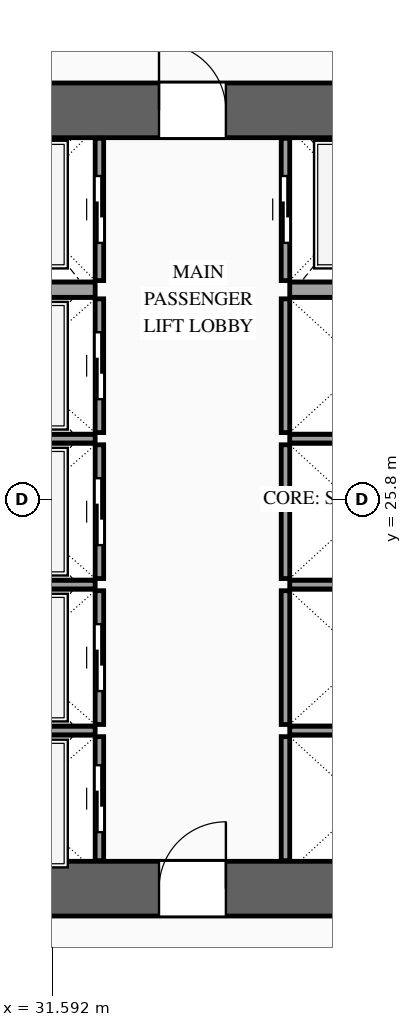
"""IFC4 building model, lengths in metres.
Left out: names, types, materials, properties, quantities, classifications, styles, units other than length and angle.
Written with IfcOpenShell. Run it as: python <this file> out.ifc"""

import sys

from ifc_helpers import new_model, si_unit, direction, frame, frame_2d, origin, place, context, subcontext, project, spatial, rectangle, extrude, source, transform, mapped, element, fill, save


model = new_model("IFC4")
c1 = context("Model", 3, precision=1e-05, world=origin(), true_north=direction((0.0, 1.0)))
c2 = subcontext(c1, "Body", "Model", "MODEL_VIEW")
j1 = project(units=[si_unit("LENGTHUNIT", "METRE"), si_unit("PLANEANGLEUNIT", "RADIAN")], contexts=[c1])
p1 = place(None, origin())
s1 = spatial("IfcSite", under=j1, at=p1, CompositionType="ELEMENT")
p2 = place(p1, origin())
s2 = spatial("IfcBuilding", under=s1, at=p2, CompositionType="ELEMENT")
p3 = place(p2, frame((0.0, 0.0, 60.4)))
s3 = spatial("IfcBuildingStorey", under=s2, at=p3, CompositionType="ELEMENT", Elevation=60.4)
p4 = place(p3, frame((23.35, 19.4, 0.0), z_axis=(0.0, 0.0, 1.0), x_axis=(1.0, 0.0, 0.0)))
e1 = element("IfcWall", 1, at=p4, inside=s3, PredefinedType="SHEAR", context=c2, shape_type="SweptSolid", body=[
    extrude(rectangle(XDim=27.3, YDim=0.9, at=frame_2d((13.65, 0.0))), origin(), (0.0, 0.0, 1.0), 3.6),
])
p5 = place(p4, frame((2.1, 0.0, 0.0)))
e2 = element("IfcOpeningElement", 2, at=p5, cuts=e1, PredefinedType="OPENING", context=c2, shape_type="SweptSolid", body=[
    extrude(rectangle(XDim=1.1, YDim=2.2, at=frame_2d((0.55, 1.1))), frame((0.0, 0.465, 0.0), z_axis=(0.0, -1.0, 0.0), x_axis=(1.0, 0.0, 0.0)), (0.0, 0.0, 1.0), 0.93),
])
p6 = place(p4, frame((10.0, 0.0, 0.0)))
e3 = element("IfcOpeningElement", 3, at=p6, cuts=e1, PredefinedType="OPENING", context=c2, shape_type="SweptSolid", body=[
    extrude(rectangle(XDim=1.1, YDim=2.2, at=frame_2d((0.55, 1.1))), frame((0.0, 0.465, 0.0), z_axis=(0.0, -1.0, 0.0), x_axis=(1.0, 0.0, 0.0)), (0.0, 0.0, 1.0), 0.93),
])
p7 = place(p4, frame((23.2, 0.0, 0.0)))
e4 = element("IfcOpeningElement", 4, at=p7, cuts=e1, PredefinedType="OPENING", context=c2, shape_type="SweptSolid", body=[
    extrude(rectangle(XDim=1.1, YDim=2.2, at=frame_2d((0.55, 1.1))), frame((0.0, 0.465, 0.0), z_axis=(0.0, -1.0, 0.0), x_axis=(1.0, 0.0, 0.0)), (0.0, 0.0, 1.0), 0.93),
])
p8 = place(p4, frame((19.82, 0.0, 0.0)))
e5 = element("IfcOpeningElement", 5, at=p8, cuts=e1, PredefinedType="OPENING", context=c2, shape_type="SweptSolid", body=[
    extrude(rectangle(XDim=0.9, YDim=2.15, at=frame_2d((0.45, 1.075))), frame((0.0, 0.465, 0.0), z_axis=(0.0, -1.0, 0.0), x_axis=(1.0, 0.0, 0.0)), (0.0, 0.0, 1.0), 0.93),
])
p9 = place(p4, frame((18.38, 0.0, 0.0)))
e6 = element("IfcOpeningElement", 6, at=p9, cuts=e1, PredefinedType="OPENING", context=c2, shape_type="SweptSolid", body=[
    extrude(rectangle(XDim=0.9, YDim=2.15, at=frame_2d((0.45, 1.075))), frame((0.0, 0.465, 0.0), z_axis=(0.0, -1.0, 0.0), x_axis=(1.0, 0.0, 0.0)), (0.0, 0.0, 1.0), 0.93),
])
p10 = place(p3, frame((23.35, 32.2, 0.0), z_axis=(0.0, 0.0, 1.0), x_axis=(1.0, 0.0, 0.0)))
e7 = element("IfcWall", 7, at=p10, inside=s3, PredefinedType="SHEAR", context=c2, shape_type="SweptSolid", body=[
    extrude(rectangle(XDim=27.3, YDim=0.9, at=frame_2d((13.65, 0.0))), origin(), (0.0, 0.0, 1.0), 3.6),
])
p11 = place(p10, frame((4.72, 0.0, 0.0)))
e8 = element("IfcOpeningElement", 8, at=p11, cuts=e7, PredefinedType="OPENING", context=c2, shape_type="SweptSolid", body=[
    extrude(rectangle(XDim=0.9, YDim=2.15, at=frame_2d((0.45, 1.075))), frame((0.0, 0.465, 0.0), z_axis=(0.0, -1.0, 0.0), x_axis=(1.0, 0.0, 0.0)), (0.0, 0.0, 1.0), 0.93),
])
p12 = place(p10, frame((10.0, 0.0, 0.0)))
e9 = element("IfcOpeningElement", 9, at=p12, cuts=e7, PredefinedType="OPENING", context=c2, shape_type="SweptSolid", body=[
    extrude(rectangle(XDim=1.1, YDim=2.2, at=frame_2d((0.55, 1.1))), frame((0.0, 0.465, 0.0), z_axis=(0.0, -1.0, 0.0), x_axis=(1.0, 0.0, 0.0)), (0.0, 0.0, 1.0), 0.93),
])
p13 = place(p10, frame((15.85, 0.0, 0.0)))
e10 = element("IfcOpeningElement", 10, at=p13, cuts=e7, PredefinedType="OPENING", context=c2, shape_type="SweptSolid", body=[
    extrude(rectangle(XDim=1.1, YDim=2.2, at=frame_2d((0.55, 1.1))), frame((0.0, 0.465, 0.0), z_axis=(0.0, -1.0, 0.0), x_axis=(1.0, 0.0, 0.0)), (0.0, 0.0, 1.0), 0.93),
])
p14 = place(p10, frame((19.82, 0.0, 0.0)))
e11 = element("IfcOpeningElement", 11, at=p14, cuts=e7, PredefinedType="OPENING", context=c2, shape_type="SweptSolid", body=[
    extrude(rectangle(XDim=0.9, YDim=2.15, at=frame_2d((0.45, 1.075))), frame((0.0, 0.465, 0.0), z_axis=(0.0, -1.0, 0.0), x_axis=(1.0, 0.0, 0.0)), (0.0, 0.0, 1.0), 0.93),
])
p15 = place(p3, frame((32.37, 19.86, 0.0), z_axis=(0.0, 0.0, 1.0), x_axis=(0.0, 1.0, 0.0)))
e12 = element("IfcWall", 12, at=p15, inside=s3, PredefinedType="SOLIDWALL", context=c2, shape_type="SweptSolid", body=[
    extrude(rectangle(XDim=2.04, YDim=0.14, at=frame_2d((1.02, 0.0))), origin(), (0.0, 0.0, 1.0), 3.38),
])
p16 = place(p15, frame((0.47, 0.0, 0.0)))
e13 = element("IfcOpeningElement", 13, at=p16, cuts=e12, PredefinedType="OPENING", context=c2, shape_type="SweptSolid", body=[
    extrude(rectangle(XDim=1.1, YDim=2.2, at=frame_2d((0.55, 1.1))), frame((0.0, 0.085, 0.0), z_axis=(0.0, -1.0, 0.0), x_axis=(1.0, 0.0, 0.0)), (0.0, 0.0, 1.0), 0.17),
])
m1 = source(origin(), c2, "Body", "SweptSolid", [
    extrude(rectangle(XDim=2.5, YDim=0.14, at=frame_2d((1.25, 0.0))), origin(), (0.0, 0.0, 1.0), 3.38),
])
p17 = place(p3, frame((29.8, 22.0, 0.0), z_axis=(0.0, 0.0, 1.0), x_axis=(1.0, 0.0, 0.0)))
e14 = element("IfcWall", 14, at=p17, inside=s3, PredefinedType="SOLIDWALL", context=c2, shape_type="MappedRepresentation", body=[
    mapped(m1, transform((0.0, 0.0, 0.0), scale=1.0)),
])
p18 = place(p3, frame((32.37, 22.1, 0.0), z_axis=(0.0, 0.0, 1.0), x_axis=(0.0, 1.0, 0.0)))
e15 = element("IfcWall", 15, at=p18, inside=s3, PredefinedType="SOLIDWALL", context=c2, shape_type="SweptSolid", body=[
    extrude(rectangle(XDim=2.2, YDim=0.14, at=frame_2d((1.1, 0.0))), origin(), (0.0, 0.0, 1.0), 3.38),
])
p19 = place(p18, frame((0.55, 0.0, 0.0)))
e16 = element("IfcOpeningElement", 16, at=p19, cuts=e15, PredefinedType="OPENING", context=c2, shape_type="SweptSolid", body=[
    extrude(rectangle(XDim=1.1, YDim=2.2, at=frame_2d((0.55, 1.1))), frame((0.0, 0.085, 0.0), z_axis=(0.0, -1.0, 0.0), x_axis=(1.0, 0.0, 0.0)), (0.0, 0.0, 1.0), 0.17),
])
p20 = place(p3, frame((29.8, 24.4, 0.0), z_axis=(0.0, 0.0, 1.0), x_axis=(1.0, 0.0, 0.0)))
e17 = element("IfcWall", 17, at=p20, inside=s3, PredefinedType="SOLIDWALL", context=c2, shape_type="MappedRepresentation", body=[
    mapped(m1, transform((0.0, 0.0, 0.0), scale=1.0)),
])
p21 = place(p3, frame((32.37, 24.5, 0.0), z_axis=(0.0, 0.0, 1.0), x_axis=(0.0, 1.0, 0.0)))
e18 = element("IfcWall", 18, at=p21, inside=s3, PredefinedType="SOLIDWALL", context=c2, shape_type="SweptSolid", body=[
    extrude(rectangle(XDim=2.2, YDim=0.14, at=frame_2d((1.1, 0.0))), origin(), (0.0, 0.0, 1.0), 3.38),
])
p22 = place(p21, frame((0.55, 0.0, 0.0)))
e19 = element("IfcOpeningElement", 19, at=p22, cuts=e18, PredefinedType="OPENING", context=c2, shape_type="SweptSolid", body=[
    extrude(rectangle(XDim=1.1, YDim=2.2, at=frame_2d((0.55, 1.1))), frame((0.0, 0.085, 0.0), z_axis=(0.0, -1.0, 0.0), x_axis=(1.0, 0.0, 0.0)), (0.0, 0.0, 1.0), 0.17),
])
p23 = place(p3, frame((29.8, 26.8, 0.0), z_axis=(0.0, 0.0, 1.0), x_axis=(1.0, 0.0, 0.0)))
e20 = element("IfcWall", 20, at=p23, inside=s3, PredefinedType="SOLIDWALL", context=c2, shape_type="MappedRepresentation", body=[
    mapped(m1, transform((0.0, 0.0, 0.0), scale=1.0)),
])
p24 = place(p3, frame((32.37, 26.9, 0.0), z_axis=(0.0, 0.0, 1.0), x_axis=(0.0, 1.0, 0.0)))
e21 = element("IfcWall", 21, at=p24, inside=s3, PredefinedType="SOLIDWALL", context=c2, shape_type="SweptSolid", body=[
    extrude(rectangle(XDim=2.2, YDim=0.14, at=frame_2d((1.1, 0.0))), origin(), (0.0, 0.0, 1.0), 3.38),
])
p25 = place(p24, frame((0.55, 0.0, 0.0)))
e22 = element("IfcOpeningElement", 22, at=p25, cuts=e21, PredefinedType="OPENING", context=c2, shape_type="SweptSolid", body=[
    extrude(rectangle(XDim=1.1, YDim=2.2, at=frame_2d((0.55, 1.1))), frame((0.0, 0.085, 0.0), z_axis=(0.0, -1.0, 0.0), x_axis=(1.0, 0.0, 0.0)), (0.0, 0.0, 1.0), 0.17),
])
p26 = place(p3, frame((32.37, 29.4, 0.0), z_axis=(0.0, 0.0, 1.0), x_axis=(0.0, 1.0, 0.0)))
e23 = element("IfcWall", 23, at=p26, inside=s3, PredefinedType="SOLIDWALL", context=c2, shape_type="SweptSolid", body=[
    extrude(rectangle(XDim=2.34, YDim=0.14, at=frame_2d((1.17, 0.0))), origin(), (0.0, 0.0, 1.0), 3.38),
])
p27 = place(p26, frame((0.62, 0.0, 0.0)))
e24 = element("IfcOpeningElement", 24, at=p27, cuts=e23, PredefinedType="OPENING", context=c2, shape_type="SweptSolid", body=[
    extrude(rectangle(XDim=1.1, YDim=2.2, at=frame_2d((0.55, 1.1))), frame((0.0, 0.085, 0.0), z_axis=(0.0, -1.0, 0.0), x_axis=(1.0, 0.0, 0.0)), (0.0, 0.0, 1.0), 0.17),
])
m2 = source(origin(), c2, "Body", "SweptSolid", [
    extrude(rectangle(XDim=2.5, YDim=0.25, at=frame_2d((1.25, 0.0))), origin(), (0.0, 0.0, 1.0), 3.38),
])
p28 = place(p3, frame((29.8, 29.25, 0.0), z_axis=(0.0, 0.0, 1.0), x_axis=(1.0, 0.0, 0.0)))
e25 = element("IfcWall", 25, at=p28, inside=s3, PredefinedType="SOLIDWALL", context=c2, shape_type="MappedRepresentation", body=[
    mapped(m2, transform((0.0, 0.0, 0.0), scale=1.0)),
])
m3 = source(origin(), c2, "Body", "SweptSolid", [
    extrude(rectangle(XDim=2.04, YDim=0.14, at=frame_2d((1.02, 0.0))), origin(), (0.0, 0.0, 1.0), 3.38),
])
p29 = place(p3, frame((35.43, 19.86, 0.0), z_axis=(0.0, 0.0, 1.0), x_axis=(0.0, 1.0, 0.0)))
e26 = element("IfcWall", 26, at=p29, inside=s3, PredefinedType="SOLIDWALL", context=c2, shape_type="MappedRepresentation", body=[
    mapped(m3, transform((0.0, 0.0, 0.0), scale=1.0)),
])
m4 = source(origin(), c2, "Body", "SweptSolid", [
    extrude(rectangle(XDim=2.4, YDim=0.14, at=frame_2d((1.2, 0.0))), origin(), (0.0, 0.0, 1.0), 3.38),
])
p30 = place(p3, frame((35.5, 22.0, 0.0), z_axis=(0.0, 0.0, 1.0), x_axis=(1.0, 0.0, 0.0)))
e27 = element("IfcWall", 27, at=p30, inside=s3, PredefinedType="SOLIDWALL", context=c2, shape_type="MappedRepresentation", body=[
    mapped(m4, transform((0.0, 0.0, 0.0), scale=1.0)),
])
m5 = source(origin(), c2, "Body", "SweptSolid", [
    extrude(rectangle(XDim=2.2, YDim=0.14, at=frame_2d((1.1, 0.0))), origin(), (0.0, 0.0, 1.0), 3.38),
])
p31 = place(p3, frame((35.43, 22.1, 0.0), z_axis=(0.0, 0.0, 1.0), x_axis=(0.0, 1.0, 0.0)))
e28 = element("IfcWall", 28, at=p31, inside=s3, PredefinedType="SOLIDWALL", context=c2, shape_type="MappedRepresentation", body=[
    mapped(m5, transform((0.0, 0.0, 0.0), scale=1.0)),
])
p32 = place(p3, frame((35.5, 24.4, 0.0), z_axis=(0.0, 0.0, 1.0), x_axis=(1.0, 0.0, 0.0)))
e29 = element("IfcWall", 29, at=p32, inside=s3, PredefinedType="SOLIDWALL", context=c2, shape_type="MappedRepresentation", body=[
    mapped(m4, transform((0.0, 0.0, 0.0), scale=1.0)),
])
p33 = place(p3, frame((35.43, 24.5, 0.0), z_axis=(0.0, 0.0, 1.0), x_axis=(0.0, 1.0, 0.0)))
e30 = element("IfcWall", 30, at=p33, inside=s3, PredefinedType="SOLIDWALL", context=c2, shape_type="MappedRepresentation", body=[
    mapped(m5, transform((0.0, 0.0, 0.0), scale=1.0)),
])
p34 = place(p3, frame((35.5, 26.8, 0.0), z_axis=(0.0, 0.0, 1.0), x_axis=(1.0, 0.0, 0.0)))
e31 = element("IfcWall", 31, at=p34, inside=s3, PredefinedType="SOLIDWALL", context=c2, shape_type="MappedRepresentation", body=[
    mapped(m4, transform((0.0, 0.0, 0.0), scale=1.0)),
])
m6 = source(origin(), c2, "Body", "SweptSolid", [
    extrude(rectangle(XDim=2.2, YDim=0.14, at=frame_2d((1.1, 0.0))), origin(), (0.0, 0.0, 1.0), 3.38),
])
p35 = place(p3, frame((35.43, 26.9, 0.0), z_axis=(0.0, 0.0, 1.0), x_axis=(0.0, 1.0, 0.0)))
e32 = element("IfcWall", 32, at=p35, inside=s3, PredefinedType="SOLIDWALL", context=c2, shape_type="MappedRepresentation", body=[
    mapped(m6, transform((0.0, 0.0, 0.0), scale=1.0)),
])
p36 = place(p3, frame((35.43, 29.4, 0.0), z_axis=(0.0, 0.0, 1.0), x_axis=(0.0, 1.0, 0.0)))
e33 = element("IfcWall", 33, at=p36, inside=s3, PredefinedType="SOLIDWALL", context=c2, shape_type="SweptSolid", body=[
    extrude(rectangle(XDim=2.34, YDim=0.14, at=frame_2d((1.17, 0.0))), origin(), (0.0, 0.0, 1.0), 3.38),
])
p37 = place(p36, frame((0.62, 0.0, 0.0)))
e34 = element("IfcOpeningElement", 34, at=p37, cuts=e33, PredefinedType="OPENING", context=c2, shape_type="SweptSolid", body=[
    extrude(rectangle(XDim=1.1, YDim=2.2, at=frame_2d((0.55, 1.1))), frame((0.0, 0.085, 0.0), z_axis=(0.0, -1.0, 0.0), x_axis=(1.0, 0.0, 0.0)), (0.0, 0.0, 1.0), 0.17),
])
m7 = source(origin(), c2, "Body", "SweptSolid", [
    extrude(rectangle(XDim=2.4, YDim=0.25, at=frame_2d((1.2, 0.0))), origin(), (0.0, 0.0, 1.0), 3.38),
])
p38 = place(p3, frame((35.5, 29.25, 0.0), z_axis=(0.0, 0.0, 1.0), x_axis=(1.0, 0.0, 0.0)))
e35 = element("IfcWall", 35, at=p38, inside=s3, PredefinedType="SOLIDWALL", context=c2, shape_type="MappedRepresentation", body=[
    mapped(m7, transform((0.0, 0.0, 0.0), scale=1.0)),
])
m8 = source(origin(), c2, "Body", "SweptSolid", [
    extrude(rectangle(XDim=1.1, YDim=2.2, at=frame_2d((0.55, 1.1))), frame((0.0, 0.025, 0.0), z_axis=(0.0, -1.0, 0.0), x_axis=(1.0, 0.0, 0.0)), (0.0, 0.0, 1.0), 0.05),
])
p39 = place(p16, origin())
e36 = element("IfcDoor", 36, at=p39, inside=s3, OperationType="SLIDING_TO_LEFT", PredefinedType="DOOR", context=c2, shape_type="MappedRepresentation", body=[
    mapped(m8, transform((0.0, 0.0, 0.0), scale=1.0)),
])
fill(e13, e36)
p40 = place(p19, origin())
e37 = element("IfcDoor", 37, at=p40, inside=s3, OperationType="SLIDING_TO_RIGHT", PredefinedType="DOOR", context=c2, shape_type="MappedRepresentation", body=[
    mapped(m8, transform((0.0, 0.0, 0.0), scale=1.0)),
])
fill(e16, e37)
p41 = place(p22, origin())
e38 = element("IfcDoor", 38, at=p41, inside=s3, OperationType="SLIDING_TO_LEFT", PredefinedType="DOOR", context=c2, shape_type="MappedRepresentation", body=[
    mapped(m8, transform((0.0, 0.0, 0.0), scale=1.0)),
])
fill(e19, e38)
p42 = place(p25, origin())
e39 = element("IfcDoor", 39, at=p42, inside=s3, OperationType="SLIDING_TO_RIGHT", PredefinedType="DOOR", context=c2, shape_type="MappedRepresentation", body=[
    mapped(m8, transform((0.0, 0.0, 0.0), scale=1.0)),
])
fill(e22, e39)
p43 = place(p27, origin())
e40 = element("IfcDoor", 40, at=p43, inside=s3, OperationType="SLIDING_TO_LEFT", PredefinedType="DOOR", context=c2, shape_type="MappedRepresentation", body=[
    mapped(m8, transform((0.0, 0.0, 0.0), scale=1.0)),
])
fill(e24, e40)
p44 = place(p37, origin())
e41 = element("IfcDoor", 41, at=p44, inside=s3, OperationType="SLIDING_TO_RIGHT", PredefinedType="DOOR", context=c2, shape_type="MappedRepresentation", body=[
    mapped(m8, transform((0.0, 0.0, 0.0), scale=1.0)),
])
fill(e34, e41)
m9 = source(origin(), c2, "Body", "SweptSolid", [
    extrude(rectangle(XDim=1.1, YDim=2.2, at=frame_2d((0.55, 1.1))), frame((0.0, 0.025, 0.0), z_axis=(0.0, -1.0, 0.0), x_axis=(1.0, 0.0, 0.0)), (0.0, 0.0, 1.0), 0.05),
])
p45 = place(p6, origin())
e42 = element("IfcDoor", 42, at=p45, inside=s3, OperationType="SINGLE_SWING_RIGHT", PredefinedType="DOOR", context=c2, shape_type="MappedRepresentation", body=[
    mapped(m9, transform((0.0, 0.0, 0.0), scale=1.0)),
])
fill(e3, e42)
p46 = place(p12, origin())
e43 = element("IfcDoor", 43, at=p46, inside=s3, OperationType="SINGLE_SWING_LEFT", PredefinedType="DOOR", context=c2, shape_type="MappedRepresentation", body=[
    mapped(m9, transform((0.0, 0.0, 0.0), scale=1.0)),
])
fill(e9, e43)
save(model, sys.argv[1])
